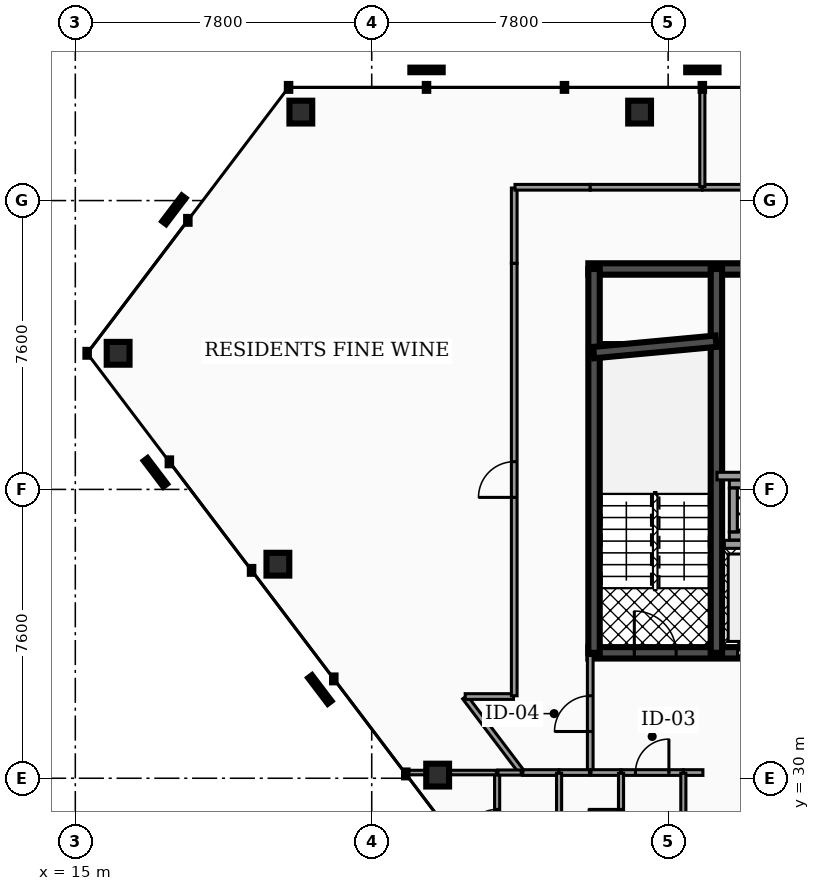
"""IFC4 building model, lengths in metres.
Left out: names, types, materials, properties, quantities, classifications, styles, units other than length and angle.
Written with IfcOpenShell. Run it as: python <this file> out.ifc"""

import sys

from ifc_helpers import new_model, si_unit, direction, frame, frame_2d, origin, origin_2d, place, context, subcontext, project, spatial, rectangle, hollow_rectangle, extrude, element, fill, save


model = new_model("IFC4")
c1 = context("Model", 3, precision=1e-05, world=origin(), true_north=direction((0.0, 1.0)))
c2 = subcontext(c1, "Body", "Model", "MODEL_VIEW")
j1 = project(units=[si_unit("LENGTHUNIT", "METRE"), si_unit("PLANEANGLEUNIT", "RADIAN")], contexts=[c1])
p1 = place(None, origin())
s1 = spatial("IfcSite", under=j1, at=p1, CompositionType="ELEMENT")
p2 = place(p1, origin())
s2 = spatial("IfcBuilding", under=s1, at=p2, CompositionType="ELEMENT")
p3 = place(p2, frame((0.0, 0.0, 235.96)))
s3 = spatial("IfcBuildingStorey", under=s2, at=p3, CompositionType="ELEMENT", Elevation=235.96)
p4 = place(p3, frame((28.5, 43.4, 0.0), z_axis=(0.0, 0.0, 1.0), x_axis=(1.0, 0.0, 0.0)))
e1 = element("IfcWall", 1, at=p4, inside=s3, PredefinedType="SHEAR", context=c2, shape_type="SweptSolid", body=[
    extrude(rectangle(XDim=19.86, YDim=0.3, at=frame_2d((9.93, 0.0))), origin(), (0.0, 0.0, 1.0), 3.18),
])
p5 = place(p3, frame((28.5, 33.3, 0.0), z_axis=(0.0, 0.0, 1.0), x_axis=(1.0, 0.0, 0.0)))
e2 = element("IfcWall", 2, at=p5, inside=s3, PredefinedType="SHEAR", context=c2, shape_type="SweptSolid", body=[
    extrude(rectangle(XDim=19.86, YDim=0.3, at=frame_2d((9.93, 0.0))), origin(), (0.0, 0.0, 1.0), 3.18),
])
p6 = place(p5, frame((3.93, 0.0, 0.0)))
e3 = element("IfcOpeningElement", 3, at=p6, cuts=e2, PredefinedType="OPENING", context=c2, shape_type="SweptSolid", body=[
    extrude(rectangle(XDim=1.1, YDim=2.15, at=frame_2d((0.55, 1.075))), frame((0.0, 0.16, 0.0), z_axis=(0.0, -1.0, 0.0), x_axis=(1.0, 0.0, 0.0)), (0.0, 0.0, 1.0), 0.32),
])
p7 = place(p5, frame((14.77, 0.0, 0.0)))
e4 = element("IfcOpeningElement", 4, at=p7, cuts=e2, PredefinedType="OPENING", context=c2, shape_type="SweptSolid", body=[
    extrude(rectangle(XDim=1.1, YDim=2.15, at=frame_2d((0.55, 1.075))), frame((0.0, 0.16, 0.0), z_axis=(0.0, -1.0, 0.0), x_axis=(1.0, 0.0, 0.0)), (0.0, 0.0, 1.0), 0.32),
])
p8 = place(p5, frame((11.25, 0.0, 0.0)))
e5 = element("IfcOpeningElement", 5, at=p8, cuts=e2, PredefinedType="OPENING", context=c2, shape_type="SweptSolid", body=[
    extrude(rectangle(XDim=1.0, YDim=2.1, at=frame_2d((0.5, 1.05))), frame((0.0, 0.16, 0.0), z_axis=(0.0, -1.0, 0.0), x_axis=(1.0, 0.0, 0.0)), (0.0, 0.0, 1.0), 0.32),
])
p9 = place(p5, frame((12.95, 0.0, 0.0)))
e6 = element("IfcOpeningElement", 6, at=p9, cuts=e2, PredefinedType="OPENING", context=c2, shape_type="SweptSolid", body=[
    extrude(rectangle(XDim=1.0, YDim=2.1, at=frame_2d((0.5, 1.05))), frame((0.0, 0.16, 0.0), z_axis=(0.0, -1.0, 0.0), x_axis=(1.0, 0.0, 0.0)), (0.0, 0.0, 1.0), 0.32),
])
p10 = place(p5, frame((5.85, 0.0, 0.0)))
e7 = element("IfcOpeningElement", 7, at=p10, cuts=e2, PredefinedType="OPENING", context=c2, shape_type="SweptSolid", body=[
    extrude(rectangle(XDim=1.0, YDim=2.1, at=frame_2d((0.5, 1.05))), frame((0.0, 0.16, 0.0), z_axis=(0.0, -1.0, 0.0), x_axis=(1.0, 0.0, 0.0)), (0.0, 0.0, 1.0), 0.32),
])
p11 = place(p5, frame((1.21, 0.0, 0.0)))
e8 = element("IfcOpeningElement", 8, at=p11, cuts=e2, PredefinedType="OPENING", context=c2, shape_type="SweptSolid", body=[
    extrude(rectangle(XDim=1.1, YDim=2.2, at=frame_2d((0.55, 1.1))), frame((0.0, 0.16, 0.0), z_axis=(0.0, -1.0, 0.0), x_axis=(1.0, 0.0, 0.0)), (0.0, 0.0, 1.0), 0.32),
])
p12 = place(p5, frame((9.34, 0.0, 0.0)))
e9 = element("IfcOpeningElement", 9, at=p12, cuts=e2, PredefinedType="OPENING", context=c2, shape_type="SweptSolid", body=[
    extrude(rectangle(XDim=1.12, YDim=2.05, at=frame_2d((0.56, 1.025))), frame((0.0, 0.16, 0.0), z_axis=(0.0, -1.0, 0.0), x_axis=(1.0, 0.0, 0.0)), (0.0, 0.0, 1.0), 0.32),
])
p13 = place(p5, frame((17.55, 0.0, 0.0)))
e10 = element("IfcOpeningElement", 10, at=p13, cuts=e2, PredefinedType="OPENING", context=c2, shape_type="SweptSolid", body=[
    extrude(rectangle(XDim=1.1, YDim=2.2, at=frame_2d((0.55, 1.1))), frame((0.0, 0.16, 0.0), z_axis=(0.0, -1.0, 0.0), x_axis=(1.0, 0.0, 0.0)), (0.0, 0.0, 1.0), 0.32),
])
for number, where, z_axis, x_axis in (
    (11, (28.65, 33.3, 0.0), (0.0, 0.0, 1.0), (0.0, 1.0, 0.0)),
    (12, (31.87, 33.3, 0.0), (0.0, 0.0, 1.0), (0.0, 1.0, 0.0)),
):
    element("IfcWall", number, at=place(p3, frame(where, z_axis=z_axis, x_axis=x_axis)), inside=s3, PredefinedType="SHEAR", context=c2, shape_type="SweptSolid", body=[
        extrude(rectangle(XDim=10.1, YDim=0.3, at=frame_2d((5.05, 0.0))), origin(), (0.0, 0.0, 1.0), 3.18),
    ])
p14 = place(p3, frame((28.64, 41.2, 0.0), z_axis=(0.0, 0.0, 1.0), x_axis=(0.995687118776, 0.092774789157, 0.0)))
e13 = element("IfcWall", 13, at=p14, inside=s3, PredefinedType="SHEAR", context=c2, shape_type="SweptSolid", body=[
    extrude(rectangle(XDim=3.234, YDim=0.3, at=frame_2d((1.617, 0.0))), origin(), (0.0, 0.0, 1.0), 3.18),
])
p15 = place(p3, frame((29.849, 47.528, 0.0), z_axis=(-0.03282008895, -0.036654211491, 0.998788921916), x_axis=(0.744996687719, -0.667068163899, 0.0)))
e14 = element("IfcColumn", 14, at=p15, inside=s3, PredefinedType="COLUMN", context=c2, shape_type="SweptSolid", body=[
    extrude(hollow_rectangle(XDim=0.6, YDim=0.6, WallThickness=0.03, at=origin_2d()), origin(), (0.0, 0.0, 1.0), 3.184),
])
p16 = place(p3, frame((20.935, 47.528, 0.0), z_axis=(-0.059813988517, -0.036608305392, 0.997538028726), x_axis=(0.522024164568, -0.852930695665, 0.0)))
e15 = element("IfcColumn", 15, at=p16, inside=s3, PredefinedType="COLUMN", context=c2, shape_type="SweptSolid", body=[
    extrude(hollow_rectangle(XDim=0.6, YDim=0.6, WallThickness=0.03, at=origin_2d()), origin(), (0.0, 0.0, 1.0), 3.188),
])
p17 = place(p3, frame((16.127, 41.181, 0.0), z_axis=(0.061219495948, 0.122819237213, 0.99053904935), x_axis=(-0.894980671898, 0.446104916952, 0.0)))
e16 = element("IfcColumn", 16, at=p17, inside=s3, PredefinedType="COLUMN", context=c2, shape_type="SweptSolid", body=[
    extrude(hollow_rectangle(XDim=0.6, YDim=0.6, WallThickness=0.03, at=origin_2d()), origin(), (0.0, 0.0, 1.0), 3.21),
])
p18 = place(p3, frame((20.331, 35.632, 0.0), z_axis=(0.07101494428, 0.109985631817, 0.991392978835), x_axis=(-0.840100092873, 0.542431409447, 0.0)))
e17 = element("IfcColumn", 17, at=p18, inside=s3, PredefinedType="COLUMN", context=c2, shape_type="SweptSolid", body=[
    extrude(hollow_rectangle(XDim=0.6, YDim=0.6, WallThickness=0.03, at=origin_2d()), origin(), (0.0, 0.0, 1.0), 3.208),
])
p19 = place(p3, frame((24.535, 30.083, 0.0), z_axis=(0.080805525236, 0.097179877664, 0.991981118), x_axis=(-0.768912334897, 0.639354222042, 0.0)))
e18 = element("IfcColumn", 18, at=p19, inside=s3, PredefinedType="COLUMN", context=c2, shape_type="SweptSolid", body=[
    extrude(hollow_rectangle(XDim=0.6, YDim=0.6, WallThickness=0.03, at=origin_2d()), origin(), (0.0, 0.0, 1.0), 3.206),
])
p20 = place(p3, frame((32.08, 36.155, 0.0), z_axis=(0.0, 0.0, 1.0), x_axis=(1.0, 0.0, 0.0)))
e19 = element("IfcWall", 19, at=p20, inside=s3, PredefinedType="SOLIDWALL", context=c2, shape_type="SweptSolid", body=[
    extrude(rectangle(XDim=1.8, YDim=0.21, at=frame_2d((0.9, 0.0))), origin(), (0.0, 0.0, 1.0), 3.18),
])
for number, where, z_axis, x_axis in (
    (20, (32.21, 36.375, 0.0), (0.0, 0.0, 1.0), (1.0, 0.0, 0.0)),
    (21, (32.21, 37.745, 0.0), (0.0, 0.0, 1.0), (1.0, 0.0, 0.0)),
):
    element("IfcWall", number, at=place(p3, frame(where, z_axis=z_axis, x_axis=x_axis)), inside=s3, PredefinedType="SOLIDWALL", context=c2, shape_type="SweptSolid", body=[
        extrude(rectangle(XDim=1.6, YDim=0.21, at=frame_2d((0.8, 0.0))), origin(), (0.0, 0.0, 1.0), 3.18),
    ])
p21 = place(p3, frame((32.315, 36.485, 0.0), z_axis=(0.0, 0.0, 1.0), x_axis=(0.0, 1.0, 0.0)))
e22 = element("IfcWall", 22, at=p21, inside=s3, PredefinedType="SOLIDWALL", context=c2, shape_type="SweptSolid", body=[
    extrude(rectangle(XDim=1.15, YDim=0.21, at=frame_2d((0.575, 0.0))), origin(), (0.0, 0.0, 1.0), 3.18),
])
p22 = place(p3, frame((31.885, 37.95, 0.0), z_axis=(0.0, 0.0, 1.0), x_axis=(1.0, 0.0, 0.0)))
e23 = element("IfcWall", 23, at=p22, inside=s3, PredefinedType="PARTITIONING", context=c2, shape_type="SweptSolid", body=[
    extrude(rectangle(XDim=3.895, YDim=0.2, at=frame_2d((1.948, 0.0))), origin(), (0.0, 0.0, 1.0), 2.235),
])
p23 = place(p3, frame((28.55, 30.17, 0.0), z_axis=(0.0, 0.0, 1.0), x_axis=(0.0, 1.0, 0.0)))
e24 = element("IfcWall", 24, at=p23, inside=s3, PredefinedType="PARTITIONING", context=c2, shape_type="SweptSolid", body=[
    extrude(rectangle(XDim=3.06, YDim=0.15, at=frame_2d((1.53, 0.0))), origin(), (0.0, 0.0, 1.0), 2.235),
])
p24 = place(p23, frame((1.06, 0.0, 0.0)))
e25 = element("IfcOpeningElement", 25, at=p24, cuts=e24, PredefinedType="OPENING", context=c2, shape_type="SweptSolid", body=[
    extrude(rectangle(XDim=0.94, YDim=2.05, at=frame_2d((0.47, 1.025))), frame((0.0, 0.085, 0.0), z_axis=(0.0, -1.0, 0.0), x_axis=(1.0, 0.0, 0.0)), (0.0, 0.0, 1.0), 0.17),
])
p25 = place(p3, frame((29.365, 30.15, 0.0), z_axis=(0.0, 0.0, 1.0), x_axis=(1.0, 0.0, 0.0)))
e26 = element("IfcWall", 26, at=p25, inside=s3, PredefinedType="PARTITIONING", context=c2, shape_type="SweptSolid", body=[
    extrude(rectangle(XDim=1.63, YDim=0.15, at=frame_2d((0.815, 0.0))), origin(), (0.0, 0.0, 1.0), 2.235),
])
p26 = place(p25, frame((0.375, 0.0, 0.0)))
e27 = element("IfcOpeningElement", 27, at=p26, cuts=e26, PredefinedType="OPENING", context=c2, shape_type="SweptSolid", body=[
    extrude(rectangle(XDim=0.88, YDim=2.05, at=frame_2d((0.44, 1.025))), frame((0.0, 0.085, 0.0), z_axis=(0.0, -1.0, 0.0), x_axis=(1.0, 0.0, 0.0)), (0.0, 0.0, 1.0), 0.17),
])
p27 = place(p3, frame((28.57, 30.15, 0.0), z_axis=(0.0, 0.0, 1.0), x_axis=(1.0, 0.0, 0.0)))
e28 = element("IfcWall", 28, at=p27, inside=s3, PredefinedType="PARTITIONING", context=c2, shape_type="SweptSolid", body=[
    extrude(rectangle(XDim=0.785, YDim=0.15, at=frame_2d((0.393, 0.0))), origin(), (0.0, 0.0, 1.0), 2.235),
])
p28 = place(p3, frame((31.005, 30.15, 0.0), z_axis=(0.0, 0.0, 1.0), x_axis=(1.0, 0.0, 0.0)))
e29 = element("IfcWall", 29, at=p28, inside=s3, PredefinedType="PARTITIONING", context=c2, shape_type="SweptSolid", body=[
    extrude(rectangle(XDim=0.51, YDim=0.15, at=frame_2d((0.255, 0.0))), origin(), (0.0, 0.0, 1.0), 2.235),
])
p29 = place(p3, frame((26.775, 30.15, 0.0), z_axis=(0.0, 0.0, 1.0), x_axis=(1.0, 0.0, 0.0)))
e30 = element("IfcWall", 30, at=p29, inside=s3, PredefinedType="PARTITIONING", context=c2, shape_type="SweptSolid", body=[
    extrude(rectangle(XDim=0.95, YDim=0.15, at=frame_2d((0.475, 0.0))), origin(), (0.0, 0.0, 1.0), 2.235),
])
p30 = place(p3, frame((27.735, 30.15, 0.0), z_axis=(0.0, 0.0, 1.0), x_axis=(1.0, 0.0, 0.0)))
e31 = element("IfcWall", 31, at=p30, inside=s3, PredefinedType="PARTITIONING", context=c2, shape_type="SweptSolid", body=[
    extrude(rectangle(XDim=0.795, YDim=0.15, at=frame_2d((0.397, 0.0))), origin(), (0.0, 0.0, 1.0), 2.235),
])
p31 = place(p3, frame((25.252, 32.134, 0.0), z_axis=(0.0, 0.0, 1.0), x_axis=(0.603869110647, -0.797083494502, 0.0)))
e32 = element("IfcWall", 32, at=p31, inside=s3, PredefinedType="PARTITIONING", context=c2, shape_type="SweptSolid", body=[
    extrude(rectangle(XDim=2.469, YDim=0.15, at=frame_2d((1.234, 0.0))), origin(), (0.0, 0.0, 1.0), 2.235),
])
p32 = place(p3, frame((25.26, 32.15, 0.0), z_axis=(0.0, 0.0, 1.0), x_axis=(1.0, 0.0, 0.0)))
e33 = element("IfcWall", 33, at=p32, inside=s3, PredefinedType="PARTITIONING", context=c2, shape_type="SweptSolid", body=[
    extrude(rectangle(XDim=1.271, YDim=0.15, at=frame_2d((0.635, 0.0))), origin(), (0.0, 0.0, 1.0), 2.235),
])
p33 = place(p3, frame((26.55, 32.17, 0.0), z_axis=(0.0, 0.0, 1.0), x_axis=(0.0, 1.0, 0.0)))
e34 = element("IfcWall", 34, at=p33, inside=s3, PredefinedType="PARTITIONING", context=c2, shape_type="SweptSolid", body=[
    extrude(rectangle(XDim=11.38, YDim=0.15, at=frame_2d((5.69, 0.0))), origin(), (0.0, 0.0, 1.0), 2.235),
])
p34 = place(p33, frame((5.22, 0.0, 0.0)))
e35 = element("IfcOpeningElement", 35, at=p34, cuts=e34, PredefinedType="OPENING", context=c2, shape_type="SweptSolid", body=[
    extrude(rectangle(XDim=0.94, YDim=2.05, at=frame_2d((0.47, 1.025))), frame((0.0, 0.085, 0.0), z_axis=(0.0, -1.0, 0.0), x_axis=(1.0, 0.0, 0.0)), (0.0, 0.0, 1.0), 0.17),
])
for number, where, z_axis, x_axis in (
    (36, (26.55, 43.55, 0.0), (0.0, 0.0, 1.0), (0.0, 1.0, 0.0)),
    (37, (26.57, 45.55, 0.0), (0.0, 0.0, 1.0), (1.0, 0.0, 0.0)),
):
    element("IfcWall", number, at=place(p3, frame(where, z_axis=z_axis, x_axis=x_axis)), inside=s3, PredefinedType="PARTITIONING", context=c2, shape_type="SweptSolid", body=[
        extrude(rectangle(XDim=1.98, YDim=0.15, at=frame_2d((0.99, 0.0))), origin(), (0.0, 0.0, 1.0), 2.235),
    ])
p35 = place(p3, frame((28.55, 45.55, 0.0), z_axis=(0.0, 0.0, 1.0), x_axis=(1.0, 0.0, 0.0)))
e38 = element("IfcWall", 38, at=p35, inside=s3, PredefinedType="PARTITIONING", context=c2, shape_type="SweptSolid", body=[
    extrude(rectangle(XDim=2.945, YDim=0.15, at=frame_2d((1.473, 0.0))), origin(), (0.0, 0.0, 1.0), 2.235),
])
p36 = place(p3, frame((31.505, 45.55, 0.0), z_axis=(0.0, 0.0, 1.0), x_axis=(1.0, 0.0, 0.0)))
e39 = element("IfcWall", 39, at=p36, inside=s3, PredefinedType="PARTITIONING", context=c2, shape_type="SweptSolid", body=[
    extrude(rectangle(XDim=2.474, YDim=0.15, at=frame_2d((1.237, 0.0))), origin(), (0.0, 0.0, 1.0), 2.235),
])
p37 = place(p3, frame((29.36, 27.37, 0.0), z_axis=(0.0, 0.0, 1.0), x_axis=(0.0, 1.0, 0.0)))
e40 = element("IfcWall", 40, at=p37, inside=s3, PredefinedType="PARTITIONING", context=c2, shape_type="SweptSolid", body=[
    extrude(rectangle(XDim=2.76, YDim=0.135, at=frame_2d((1.38, 0.0))), origin(), (0.0, 0.0, 1.0), 2.235),
])
p38 = place(p37, frame((0.95, 0.0, 0.0)))
e41 = element("IfcOpeningElement", 41, at=p38, cuts=e40, PredefinedType="OPENING", context=c2, shape_type="SweptSolid", body=[
    extrude(rectangle(XDim=0.86, YDim=2.05, at=frame_2d((0.43, 1.025))), frame((0.0, 0.077, 0.0), z_axis=(0.0, -1.0, 0.0), x_axis=(1.0, 0.0, 0.0)), (0.0, 0.0, 1.0), 0.155),
])
for number, where, z_axis, x_axis in (
    (42, (31.0, 27.37, 0.0), (0.0, 0.0, 1.0), (0.0, 1.0, 0.0)),
    (43, (27.73, 27.37, 0.0), (0.0, 0.0, 1.0), (0.0, 1.0, 0.0)),
):
    element("IfcWall", number, at=place(p3, frame(where, z_axis=z_axis, x_axis=x_axis)), inside=s3, PredefinedType="PARTITIONING", context=c2, shape_type="SweptSolid", body=[
        extrude(rectangle(XDim=2.76, YDim=0.135, at=frame_2d((1.38, 0.0))), origin(), (0.0, 0.0, 1.0), 2.235),
    ])
p39 = place(p3, frame((26.1, 27.37, 0.0), z_axis=(0.0, 0.0, 1.0), x_axis=(0.0, 1.0, 0.0)))
e44 = element("IfcWall", 44, at=p39, inside=s3, PredefinedType="PARTITIONING", context=c2, shape_type="SweptSolid", body=[
    extrude(rectangle(XDim=2.76, YDim=0.135, at=frame_2d((1.38, 0.0))), origin(), (0.0, 0.0, 1.0), 2.235),
])
p40 = place(p39, frame((0.95, 0.0, 0.0)))
e45 = element("IfcOpeningElement", 45, at=p40, cuts=e44, PredefinedType="OPENING", context=c2, shape_type="SweptSolid", body=[
    extrude(rectangle(XDim=0.86, YDim=2.05, at=frame_2d((0.43, 1.025))), frame((0.0, 0.077, 0.0), z_axis=(0.0, -1.0, 0.0), x_axis=(1.0, 0.0, 0.0)), (0.0, 0.0, 1.0), 0.155),
])
p41 = place(p3, frame((26.12, 30.15, 0.0), z_axis=(0.0, 0.0, 1.0), x_axis=(1.0, 0.0, 0.0)))
e46 = element("IfcWall", 46, at=p41, inside=s3, PredefinedType="PARTITIONING", context=c2, shape_type="SweptSolid", body=[
    extrude(rectangle(XDim=0.615, YDim=0.135, at=frame_2d((0.307, 0.0))), origin(), (0.0, 0.0, 1.0), 2.235),
])
p42 = place(p3, frame((23.684, 30.15, 0.0), z_axis=(0.0, 0.0, 1.0), x_axis=(1.0, 0.0, 0.0)))
e47 = element("IfcWall", 47, at=p42, inside=s3, PredefinedType="PARTITIONING", context=c2, shape_type="SweptSolid", body=[
    extrude(rectangle(XDim=0.562, YDim=0.12, at=frame_2d((0.281, 0.0))), origin(), (0.0, 0.0, 1.0), 2.235),
])
p43 = place(p3, frame((24.754, 30.15, 0.0), z_axis=(0.0, 0.0, 1.0), x_axis=(1.0, 0.0, 0.0)))
e48 = element("IfcWall", 48, at=p43, inside=s3, PredefinedType="PARTITIONING", context=c2, shape_type="SweptSolid", body=[
    extrude(rectangle(XDim=1.326, YDim=0.12, at=frame_2d((0.663, 0.0))), origin(), (0.0, 0.0, 1.0), 2.235),
])
p44 = place(p3, frame((31.5, 45.57, 0.0), z_axis=(0.0, 0.0, 1.0), x_axis=(0.0, 1.0, 0.0)))
e49 = element("IfcWall", 49, at=p44, inside=s3, PredefinedType="PARTITIONING", context=c2, shape_type="SweptSolid", body=[
    extrude(rectangle(XDim=2.593, YDim=0.135, at=frame_2d((1.296, 0.0))), origin(), (0.0, 0.0, 1.0), 2.235),
])
p45 = place(p6, origin())
e50 = element("IfcDoor", 50, at=p45, inside=s3, OperationType="SLIDING_TO_LEFT", PredefinedType="DOOR", context=c2, shape_type="SweptSolid", body=[
    extrude(rectangle(XDim=1.1, YDim=2.15, at=frame_2d((0.55, 1.075))), frame((0.0, 0.025, 0.0), z_axis=(0.0, -1.0, 0.0), x_axis=(1.0, 0.0, 0.0)), (0.0, 0.0, 1.0), 0.05),
])
fill(e3, e50)
p46 = place(p11, origin())
e51 = element("IfcDoor", 51, at=p46, inside=s3, OperationType="SINGLE_SWING_LEFT", PredefinedType="DOOR", context=c2, shape_type="SweptSolid", body=[
    extrude(rectangle(XDim=1.1, YDim=2.2, at=frame_2d((0.55, 1.1))), frame((0.0, 0.025, 0.0), z_axis=(0.0, -1.0, 0.0), x_axis=(1.0, 0.0, 0.0)), (0.0, 0.0, 1.0), 0.05),
])
fill(e8, e51)
p47 = place(p24, origin())
e52 = element("IfcDoor", 52, at=p47, inside=s3, OperationType="SINGLE_SWING_LEFT", PredefinedType="DOOR", context=c2, shape_type="SweptSolid", body=[
    extrude(rectangle(XDim=0.94, YDim=2.05, at=frame_2d((0.47, 1.025))), frame((0.0, 0.025, 0.0), z_axis=(0.0, -1.0, 0.0), x_axis=(1.0, 0.0, 0.0)), (0.0, 0.0, 1.0), 0.05),
])
fill(e25, e52)
p48 = place(p26, origin())
e53 = element("IfcDoor", 53, at=p48, inside=s3, OperationType="SINGLE_SWING_RIGHT", PredefinedType="DOOR", context=c2, shape_type="SweptSolid", body=[
    extrude(rectangle(XDim=0.88, YDim=2.05, at=frame_2d((0.44, 1.025))), frame((0.0, 0.025, 0.0), z_axis=(0.0, -1.0, 0.0), x_axis=(1.0, 0.0, 0.0)), (0.0, 0.0, 1.0), 0.05),
])
fill(e27, e53)
p49 = place(p34, origin())
e54 = element("IfcDoor", 54, at=p49, inside=s3, OperationType="SINGLE_SWING_LEFT", PredefinedType="DOOR", context=c2, shape_type="SweptSolid", body=[
    extrude(rectangle(XDim=0.94, YDim=2.05, at=frame_2d((0.47, 1.025))), frame((0.0, 0.025, 0.0), z_axis=(0.0, -1.0, 0.0), x_axis=(1.0, 0.0, 0.0)), (0.0, 0.0, 1.0), 0.05),
])
fill(e35, e54)
p50 = place(p38, origin())
e55 = element("IfcDoor", 55, at=p50, inside=s3, OperationType="SINGLE_SWING_RIGHT", PredefinedType="DOOR", context=c2, shape_type="SweptSolid", body=[
    extrude(rectangle(XDim=0.86, YDim=2.05, at=frame_2d((0.43, 1.025))), frame((0.0, 0.025, 0.0), z_axis=(0.0, -1.0, 0.0), x_axis=(1.0, 0.0, 0.0)), (0.0, 0.0, 1.0), 0.05),
])
fill(e41, e55)
p51 = place(p40, origin())
e56 = element("IfcDoor", 56, at=p51, inside=s3, OperationType="SINGLE_SWING_LEFT", PredefinedType="DOOR", context=c2, shape_type="SweptSolid", body=[
    extrude(rectangle(XDim=0.86, YDim=2.05, at=frame_2d((0.43, 1.025))), frame((0.0, 0.025, 0.0), z_axis=(0.0, -1.0, 0.0), x_axis=(1.0, 0.0, 0.0)), (0.0, 0.0, 1.0), 0.05),
])
fill(e45, e56)
save(model, sys.argv[1])
